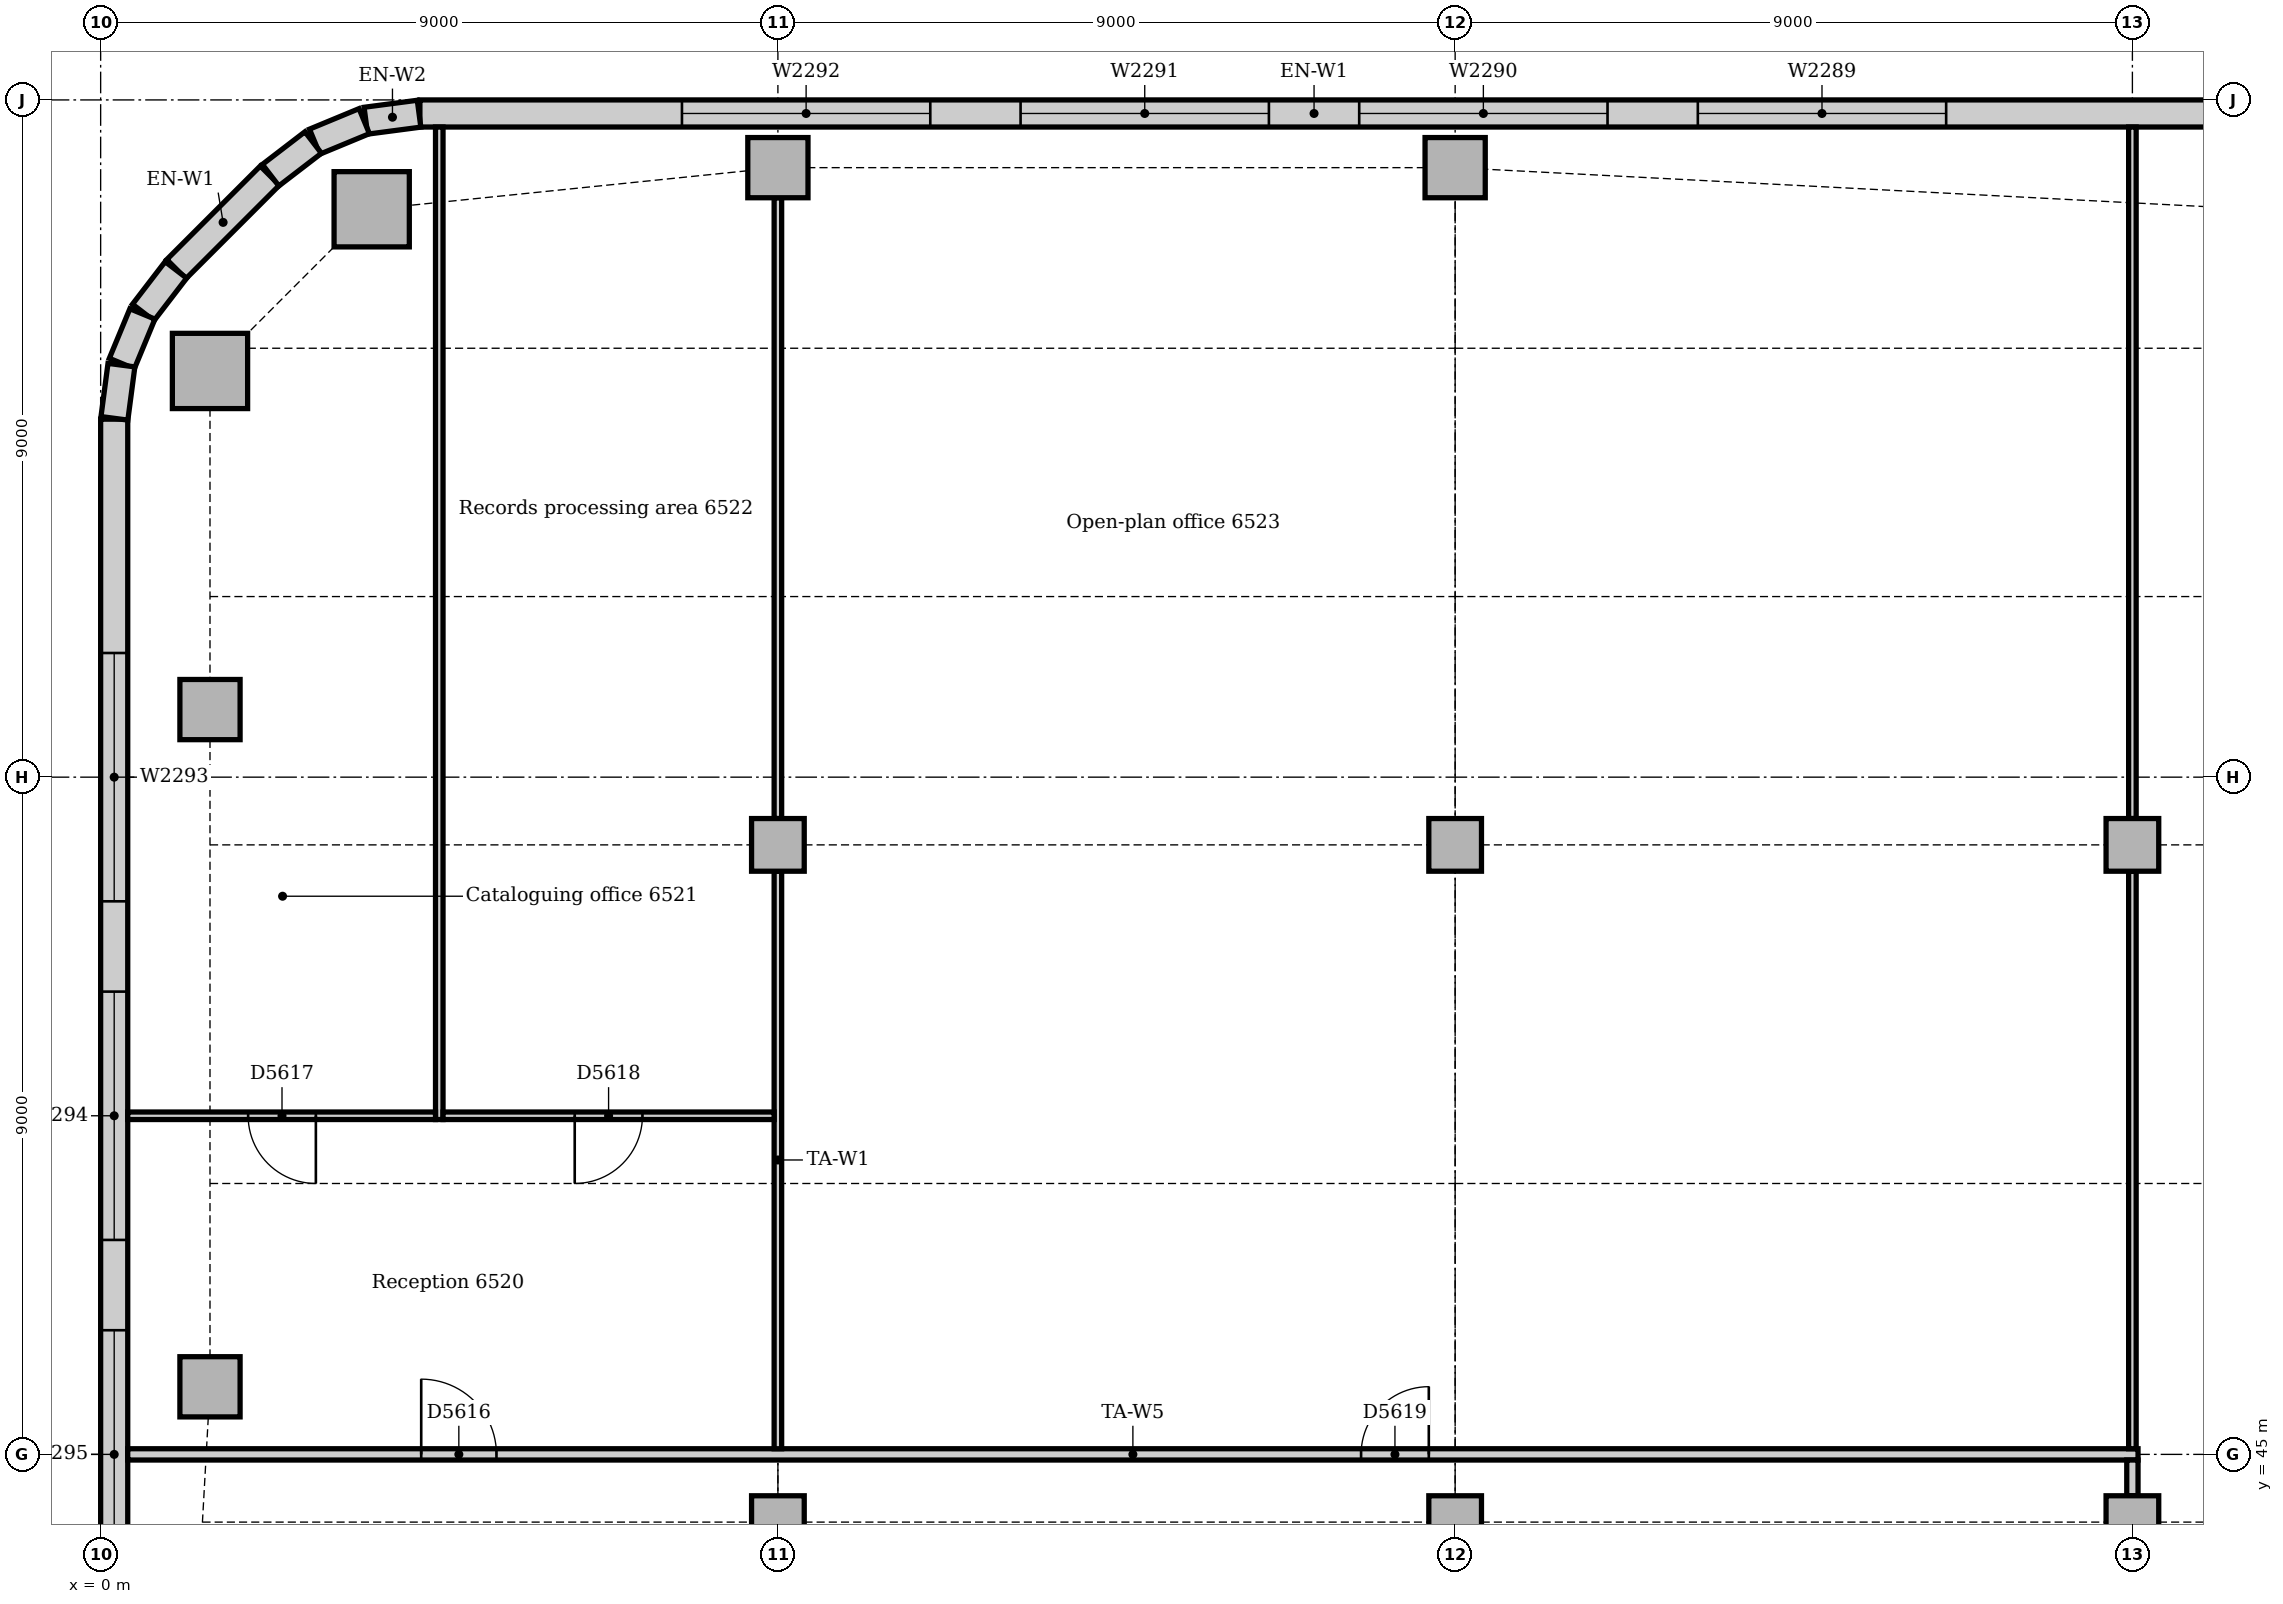
"""IFC4 building model, lengths in metres.
Left out: names, types, materials, properties, quantities, classifications, styles, units other than length and angle.
Written with IfcOpenShell. Run it as: python <this file> out.ifc"""

import sys

from ifc_helpers import new_model, si_unit, direction, frame, frame_2d, origin, origin_2d, place, context, subcontext, project, spatial, rectangle, extrude, element, fill, save


model = new_model("IFC4")
c1 = context("Model", 3, precision=1e-05, world=origin(), true_north=direction((0.0, 1.0)))
c2 = subcontext(c1, "Body", "Model", "MODEL_VIEW")
j1 = project(units=[si_unit("LENGTHUNIT", "METRE"), si_unit("PLANEANGLEUNIT", "RADIAN")], contexts=[c1])
p1 = place(None, origin())
s1 = spatial("IfcSite", under=j1, at=p1, CompositionType="ELEMENT")
p2 = place(p1, origin())
s2 = spatial("IfcBuilding", under=s1, at=p2, CompositionType="ELEMENT")
p3 = place(p2, frame((0.0, 0.0, 271.0)))
s3 = spatial("IfcBuildingStorey", under=s2, at=p3, CompositionType="ELEMENT", Elevation=271.0)
for number, where, z_axis, x_axis in (
    (1, (3.602, 61.547, 0.0), (0.0, 0.0, 1.0), (1.0, 0.0, 0.0)),
    (2, (1.453, 59.398, 0.0), (0.0, 0.0, 1.0), (1.0, 0.0, 0.0)),
):
    element("IfcColumn", number, at=place(p3, frame(where, z_axis=z_axis, x_axis=x_axis)), inside=s3, PredefinedType="COLUMN", context=c2, shape_type="SweptSolid", body=[
        extrude(rectangle(XDim=1.0, YDim=1.0, at=origin_2d()), origin(), (0.0, 0.0, 1.0), 3.85),
    ])
for number, where, z_axis, x_axis in (
    (3, (9.0, 62.1, 0.0), (0.0, 0.0, 1.0), (1.0, 0.0, 0.0)),
    (4, (18.0, 62.1, 0.0), (0.0, 0.0, 1.0), (1.0, 0.0, 0.0)),
    (5, (1.453, 45.898, 0.0), (0.0, 0.0, 1.0), (1.0, 0.0, 0.0)),
    (6, (1.453, 54.898, 0.0), (0.0, 0.0, 1.0), (1.0, 0.0, 0.0)),
):
    element("IfcColumn", number, at=place(p3, frame(where, z_axis=z_axis, x_axis=x_axis)), inside=s3, PredefinedType="COLUMN", context=c2, shape_type="SweptSolid", body=[
        extrude(rectangle(XDim=0.8, YDim=0.8, at=origin_2d()), origin(), (0.0, 0.0, 1.0), 3.85),
    ])
for number, where, z_axis, x_axis in (
    (7, (9.0, 44.1, 0.0), (0.0, 0.0, 1.0), (1.0, 0.0, 0.0)),
    (8, (9.0, 53.1, 0.0), (0.0, 0.0, 1.0), (1.0, 0.0, 0.0)),
    (9, (18.0, 44.1, 0.0), (0.0, 0.0, 1.0), (1.0, 0.0, 0.0)),
    (10, (18.0, 53.1, 0.0), (0.0, 0.0, 1.0), (1.0, 0.0, 0.0)),
    (11, (27.0, 44.1, 0.0), (0.0, 0.0, 1.0), (1.0, 0.0, 0.0)),
    (12, (27.0, 53.1, 0.0), (0.0, 0.0, 1.0), (1.0, 0.0, 0.0)),
):
    element("IfcColumn", number, at=place(p3, frame(where, z_axis=z_axis, x_axis=x_axis)), inside=s3, PredefinedType="COLUMN", context=c2, shape_type="SweptSolid", body=[
        extrude(rectangle(XDim=0.7, YDim=0.7, at=origin_2d()), origin(), (0.0, 0.0, 1.0), 3.85),
    ])
p4 = place(p3, frame((28.007, 62.82, 0.0), z_axis=(0.0, 0.0, 1.0), x_axis=(-1.0, 0.0, 0.0)))
e13 = element("IfcWall", 13, at=p4, inside=s3, PredefinedType="STANDARD", context=c2, shape_type="SweptSolid", body=[
    extrude(rectangle(XDim=23.765, YDim=0.36, at=frame_2d((11.882, 0.0))), origin(), (0.0, 0.0, 1.0), 3.85),
])
p5 = place(p4, frame((3.482, 0.0, 0.9)))
e14 = element("IfcOpeningElement", 14, at=p5, cuts=e13, PredefinedType="OPENING", context=c2, shape_type="SweptSolid", body=[
    extrude(rectangle(XDim=3.3, YDim=1.6, at=frame_2d((1.65, 0.8))), frame((0.0, 0.19, 0.0), z_axis=(0.0, -1.0, 0.0), x_axis=(1.0, 0.0, 0.0)), (0.0, 0.0, 1.0), 0.38),
])
p6 = place(p4, frame((7.982, 0.0, 0.9)))
e15 = element("IfcOpeningElement", 15, at=p6, cuts=e13, PredefinedType="OPENING", context=c2, shape_type="SweptSolid", body=[
    extrude(rectangle(XDim=3.3, YDim=1.6, at=frame_2d((1.65, 0.8))), frame((0.0, 0.19, 0.0), z_axis=(0.0, -1.0, 0.0), x_axis=(1.0, 0.0, 0.0)), (0.0, 0.0, 1.0), 0.38),
])
p7 = place(p4, frame((12.482, 0.0, 0.9)))
e16 = element("IfcOpeningElement", 16, at=p7, cuts=e13, PredefinedType="OPENING", context=c2, shape_type="SweptSolid", body=[
    extrude(rectangle(XDim=3.3, YDim=1.6, at=frame_2d((1.65, 0.8))), frame((0.0, 0.19, 0.0), z_axis=(0.0, -1.0, 0.0), x_axis=(1.0, 0.0, 0.0)), (0.0, 0.0, 1.0), 0.38),
])
p8 = place(p4, frame((16.982, 0.0, 0.9)))
e17 = element("IfcOpeningElement", 17, at=p8, cuts=e13, PredefinedType="OPENING", context=c2, shape_type="SweptSolid", body=[
    extrude(rectangle(XDim=3.3, YDim=1.6, at=frame_2d((1.65, 0.8))), frame((0.0, 0.19, 0.0), z_axis=(0.0, -1.0, 0.0), x_axis=(1.0, 0.0, 0.0)), (0.0, 0.0, 1.0), 0.38),
])
p9 = place(p3, frame((2.249, 61.994, 0.0), z_axis=(0.0, 0.0, 1.0), x_axis=(-0.707106781187, -0.707106781187, 0.0)))
e18 = element("IfcWall", 18, at=p9, inside=s3, PredefinedType="STANDARD", context=c2, shape_type="SweptSolid", body=[
    extrude(rectangle(XDim=1.757, YDim=0.36, at=frame_2d((0.879, 0.0))), origin(), (0.0, 0.0, 1.0), 3.85),
])
p10 = place(p3, frame((0.18, 58.757, 0.0), z_axis=(0.0, 0.0, 1.0), x_axis=(0.0, -1.0, 0.0)))
e19 = element("IfcWall", 19, at=p10, inside=s3, PredefinedType="STANDARD", context=c2, shape_type="SweptSolid", body=[
    extrude(rectangle(XDim=16.757, YDim=0.36, at=frame_2d((8.379, 0.0))), origin(), (0.0, 0.0, 1.0), 3.85),
])
p11 = place(p10, frame((3.107, 0.0, 0.9)))
e20 = element("IfcOpeningElement", 20, at=p11, cuts=e19, PredefinedType="OPENING", context=c2, shape_type="SweptSolid", body=[
    extrude(rectangle(XDim=3.3, YDim=1.6, at=frame_2d((1.65, 0.8))), frame((0.0, 0.19, 0.0), z_axis=(0.0, -1.0, 0.0), x_axis=(1.0, 0.0, 0.0)), (0.0, 0.0, 1.0), 0.38),
])
p12 = place(p10, frame((7.607, 0.0, 0.9)))
e21 = element("IfcOpeningElement", 21, at=p12, cuts=e19, PredefinedType="OPENING", context=c2, shape_type="SweptSolid", body=[
    extrude(rectangle(XDim=3.3, YDim=1.6, at=frame_2d((1.65, 0.8))), frame((0.0, 0.19, 0.0), z_axis=(0.0, -1.0, 0.0), x_axis=(1.0, 0.0, 0.0)), (0.0, 0.0, 1.0), 0.38),
])
p13 = place(p10, frame((12.107, 0.0, 0.9)))
e22 = element("IfcOpeningElement", 22, at=p13, cuts=e19, PredefinedType="OPENING", context=c2, shape_type="SweptSolid", body=[
    extrude(rectangle(XDim=3.3, YDim=1.6, at=frame_2d((1.65, 0.8))), frame((0.0, 0.19, 0.0), z_axis=(0.0, -1.0, 0.0), x_axis=(1.0, 0.0, 0.0)), (0.0, 0.0, 1.0), 0.38),
])
for number, where, z_axis, x_axis in (
    (23, (4.231, 62.817, 0.0), (0.0, 0.0, 1.0), (-0.991, -0.131, 0.0)),
    (24, (3.503, 62.718, 0.0), (0.0, 0.0, 1.0), (-0.924, -0.383, 0.0)),
):
    element("IfcWall", number, at=place(p3, frame(where, z_axis=z_axis, x_axis=x_axis)), inside=s3, PredefinedType="STANDARD", context=c2, shape_type="SweptSolid", body=[
        extrude(rectangle(XDim=0.713, YDim=0.36, at=frame_2d((0.356, 0.0))), origin(), (0.0, 0.0, 1.0), 3.85),
    ])
for number, where, z_axis, x_axis in (
    (25, (2.825, 62.434, 0.0), (0.0, 0.0, 1.0), (-0.793, -0.609, 0.0)),
    (26, (1.0, 60.741, 0.0), (0.0, 0.0, 1.0), (-0.609, -0.793, 0.0)),
):
    element("IfcWall", number, at=place(p3, frame(where, z_axis=z_axis, x_axis=x_axis)), inside=s3, PredefinedType="STANDARD", context=c2, shape_type="SweptSolid", body=[
        extrude(rectangle(XDim=0.713, YDim=0.36, at=frame_2d((0.357, 0.0))), origin(), (0.0, 0.0, 1.0), 3.85),
    ])
for number, where, z_axis, x_axis in (
    (27, (0.555, 60.156, 0.0), (0.0, 0.0, 1.0), (-0.383, -0.924, 0.0)),
    (28, (0.276, 59.476, 0.0), (0.0, 0.0, 1.0), (-0.131, -0.991, 0.0)),
):
    element("IfcWall", number, at=place(p3, frame(where, z_axis=z_axis, x_axis=x_axis)), inside=s3, PredefinedType="STANDARD", context=c2, shape_type="SweptSolid", body=[
        extrude(rectangle(XDim=0.713, YDim=0.36, at=frame_2d((0.356, 0.0))), origin(), (0.0, 0.0, 1.0), 3.85),
    ])
p14 = place(p3, frame((0.36, 45.0, 0.0), z_axis=(0.0, 0.0, 1.0), x_axis=(1.0, 0.0, 0.0)))
e29 = element("IfcWall", 29, at=p14, inside=s3, PredefinedType="PARTITIONING", context=c2, shape_type="SweptSolid", body=[
    extrude(rectangle(XDim=26.715, YDim=0.15, at=frame_2d((13.357, 0.0))), origin(), (0.0, 0.0, 1.0), 3.85),
])
p15 = place(p14, frame((3.9, 0.0, 0.0)))
e30 = element("IfcOpeningElement", 30, at=p15, cuts=e29, PredefinedType="OPENING", context=c2, shape_type="SweptSolid", body=[
    extrude(rectangle(XDim=1.0, YDim=2.1, at=frame_2d((0.5, 1.05))), frame((0.0, 0.085, 0.0), z_axis=(0.0, -1.0, 0.0), x_axis=(1.0, 0.0, 0.0)), (0.0, 0.0, 1.0), 0.17),
])
p16 = place(p14, frame((16.39, 0.0, 0.0)))
e31 = element("IfcOpeningElement", 31, at=p16, cuts=e29, PredefinedType="OPENING", context=c2, shape_type="SweptSolid", body=[
    extrude(rectangle(XDim=0.9, YDim=2.1, at=frame_2d((0.45, 1.05))), frame((0.0, 0.085, 0.0), z_axis=(0.0, -1.0, 0.0), x_axis=(1.0, 0.0, 0.0)), (0.0, 0.0, 1.0), 0.17),
])
p17 = place(p3, frame((27.0, 44.45, 0.0), z_axis=(0.0, 0.0, 1.0), x_axis=(0.0, 1.0, 0.0)))
e32 = element("IfcWall", 32, at=p17, inside=s3, PredefinedType="PARTITIONING", context=c2, shape_type="SweptSolid", body=[
    extrude(rectangle(XDim=0.475, YDim=0.15, at=frame_2d((0.237, 0.0))), origin(), (0.0, 0.0, 1.0), 3.85),
])
p18 = place(p3, frame((9.0, 45.075, 0.0), z_axis=(0.0, 0.0, 1.0), x_axis=(0.0, 1.0, 0.0)))
e33 = element("IfcWall", 33, at=p18, inside=s3, PredefinedType="PARTITIONING", context=c2, shape_type="SweptSolid", body=[
    extrude(rectangle(XDim=7.675, YDim=0.1, at=frame_2d((3.837, 0.0))), origin(), (0.0, 0.0, 1.0), 3.4),
])
p19 = place(p3, frame((9.0, 53.45, 0.0), z_axis=(0.0, 0.0, 1.0), x_axis=(0.0, 1.0, 0.0)))
e34 = element("IfcWall", 34, at=p19, inside=s3, PredefinedType="PARTITIONING", context=c2, shape_type="SweptSolid", body=[
    extrude(rectangle(XDim=8.25, YDim=0.1, at=frame_2d((4.125, 0.0))), origin(), (0.0, 0.0, 1.0), 3.4),
])
p20 = place(p3, frame((27.0, 45.075, 0.0), z_axis=(0.0, 0.0, 1.0), x_axis=(0.0, 1.0, 0.0)))
e35 = element("IfcWall", 35, at=p20, inside=s3, PredefinedType="PARTITIONING", context=c2, shape_type="SweptSolid", body=[
    extrude(rectangle(XDim=7.675, YDim=0.1, at=frame_2d((3.837, 0.0))), origin(), (0.0, 0.0, 1.0), 3.4),
])
p21 = place(p3, frame((27.0, 53.45, 0.0), z_axis=(0.0, 0.0, 1.0), x_axis=(0.0, 1.0, 0.0)))
e36 = element("IfcWall", 36, at=p21, inside=s3, PredefinedType="PARTITIONING", context=c2, shape_type="SweptSolid", body=[
    extrude(rectangle(XDim=9.19, YDim=0.1, at=frame_2d((4.595, 0.0))), origin(), (0.0, 0.0, 1.0), 3.4),
])
p22 = place(p3, frame((4.5, 49.45, 0.0), z_axis=(0.0, 0.0, 1.0), x_axis=(0.0, 1.0, 0.0)))
e37 = element("IfcWall", 37, at=p22, inside=s3, PredefinedType="PARTITIONING", context=c2, shape_type="SweptSolid", body=[
    extrude(rectangle(XDim=13.19, YDim=0.1, at=frame_2d((6.595, 0.0))), origin(), (0.0, 0.0, 1.0), 3.85),
])
p23 = place(p3, frame((4.55, 49.5, 0.0), z_axis=(0.0, 0.0, 1.0), x_axis=(1.0, 0.0, 0.0)))
e38 = element("IfcWall", 38, at=p23, inside=s3, PredefinedType="PARTITIONING", context=c2, shape_type="SweptSolid", body=[
    extrude(rectangle(XDim=4.4, YDim=0.1, at=frame_2d((2.2, 0.0))), origin(), (0.0, 0.0, 1.0), 3.85),
])
p24 = place(p23, frame((1.75, 0.0, 0.0)))
e39 = element("IfcOpeningElement", 39, at=p24, cuts=e38, PredefinedType="OPENING", context=c2, shape_type="SweptSolid", body=[
    extrude(rectangle(XDim=0.9, YDim=2.1, at=frame_2d((0.45, 1.05))), frame((0.0, 0.06, 0.0), z_axis=(0.0, -1.0, 0.0), x_axis=(1.0, 0.0, 0.0)), (0.0, 0.0, 1.0), 0.12),
])
p25 = place(p3, frame((0.36, 49.5, 0.0), z_axis=(0.0, 0.0, 1.0), x_axis=(1.0, 0.0, 0.0)))
e40 = element("IfcWall", 40, at=p25, inside=s3, PredefinedType="PARTITIONING", context=c2, shape_type="SweptSolid", body=[
    extrude(rectangle(XDim=4.09, YDim=0.1, at=frame_2d((2.045, 0.0))), origin(), (0.0, 0.0, 1.0), 3.85),
])
p26 = place(p25, frame((1.6, 0.0, 0.0)))
e41 = element("IfcOpeningElement", 41, at=p26, cuts=e40, PredefinedType="OPENING", context=c2, shape_type="SweptSolid", body=[
    extrude(rectangle(XDim=0.9, YDim=2.1, at=frame_2d((0.45, 1.05))), frame((0.0, 0.06, 0.0), z_axis=(0.0, -1.0, 0.0), x_axis=(1.0, 0.0, 0.0)), (0.0, 0.0, 1.0), 0.12),
])
p27 = place(p5, origin())
e42 = element("IfcWindow", 42, at=p27, inside=s3, PartitioningType="SINGLE_PANEL", PredefinedType="WINDOW", context=c2, shape_type="SweptSolid", body=[
    extrude(rectangle(XDim=3.3, YDim=1.6, at=frame_2d((1.65, 0.8))), frame((0.0, 0.13, 0.0), z_axis=(0.0, -1.0, 0.0), x_axis=(1.0, 0.0, 0.0)), (0.0, 0.0, 1.0), 0.06),
])
fill(e14, e42)
p28 = place(p6, origin())
e43 = element("IfcWindow", 43, at=p28, inside=s3, PartitioningType="SINGLE_PANEL", PredefinedType="WINDOW", context=c2, shape_type="SweptSolid", body=[
    extrude(rectangle(XDim=3.3, YDim=1.6, at=frame_2d((1.65, 0.8))), frame((0.0, 0.13, 0.0), z_axis=(0.0, -1.0, 0.0), x_axis=(1.0, 0.0, 0.0)), (0.0, 0.0, 1.0), 0.06),
])
fill(e15, e43)
p29 = place(p7, origin())
e44 = element("IfcWindow", 44, at=p29, inside=s3, PartitioningType="SINGLE_PANEL", PredefinedType="WINDOW", context=c2, shape_type="SweptSolid", body=[
    extrude(rectangle(XDim=3.3, YDim=1.6, at=frame_2d((1.65, 0.8))), frame((0.0, 0.13, 0.0), z_axis=(0.0, -1.0, 0.0), x_axis=(1.0, 0.0, 0.0)), (0.0, 0.0, 1.0), 0.06),
])
fill(e16, e44)
p30 = place(p8, origin())
e45 = element("IfcWindow", 45, at=p30, inside=s3, PartitioningType="SINGLE_PANEL", PredefinedType="WINDOW", context=c2, shape_type="SweptSolid", body=[
    extrude(rectangle(XDim=3.3, YDim=1.6, at=frame_2d((1.65, 0.8))), frame((0.0, 0.13, 0.0), z_axis=(0.0, -1.0, 0.0), x_axis=(1.0, 0.0, 0.0)), (0.0, 0.0, 1.0), 0.06),
])
fill(e17, e45)
p31 = place(p11, origin())
e46 = element("IfcWindow", 46, at=p31, inside=s3, PartitioningType="SINGLE_PANEL", PredefinedType="WINDOW", context=c2, shape_type="SweptSolid", body=[
    extrude(rectangle(XDim=3.3, YDim=1.6, at=frame_2d((1.65, 0.8))), frame((0.0, 0.13, 0.0), z_axis=(0.0, -1.0, 0.0), x_axis=(1.0, 0.0, 0.0)), (0.0, 0.0, 1.0), 0.06),
])
fill(e20, e46)
p32 = place(p12, origin())
e47 = element("IfcWindow", 47, at=p32, inside=s3, PartitioningType="SINGLE_PANEL", PredefinedType="WINDOW", context=c2, shape_type="SweptSolid", body=[
    extrude(rectangle(XDim=3.3, YDim=1.6, at=frame_2d((1.65, 0.8))), frame((0.0, 0.13, 0.0), z_axis=(0.0, -1.0, 0.0), x_axis=(1.0, 0.0, 0.0)), (0.0, 0.0, 1.0), 0.06),
])
fill(e21, e47)
p33 = place(p13, origin())
e48 = element("IfcWindow", 48, at=p33, inside=s3, PartitioningType="SINGLE_PANEL", PredefinedType="WINDOW", context=c2, shape_type="SweptSolid", body=[
    extrude(rectangle(XDim=3.3, YDim=1.6, at=frame_2d((1.65, 0.8))), frame((0.0, 0.13, 0.0), z_axis=(0.0, -1.0, 0.0), x_axis=(1.0, 0.0, 0.0)), (0.0, 0.0, 1.0), 0.06),
])
fill(e22, e48)
p34 = place(p15, origin())
e49 = element("IfcDoor", 49, at=p34, inside=s3, OperationType="SINGLE_SWING_LEFT", PredefinedType="DOOR", context=c2, shape_type="SweptSolid", body=[
    extrude(rectangle(XDim=1.0, YDim=2.1, at=frame_2d((0.5, 1.05))), frame((0.0, 0.025, 0.0), z_axis=(0.0, -1.0, 0.0), x_axis=(1.0, 0.0, 0.0)), (0.0, 0.0, 1.0), 0.05),
])
fill(e30, e49)
p35 = place(p26, frame((0.9, 0.0, 0.0), z_axis=(0.0, 0.0, 1.0), x_axis=(-1.0, 0.0, 0.0)))
e50 = element("IfcDoor", 50, at=p35, inside=s3, OperationType="SINGLE_SWING_LEFT", PredefinedType="DOOR", context=c2, shape_type="SweptSolid", body=[
    extrude(rectangle(XDim=0.9, YDim=2.1, at=frame_2d((0.45, 1.05))), frame((0.0, 0.025, 0.0), z_axis=(0.0, -1.0, 0.0), x_axis=(1.0, 0.0, 0.0)), (0.0, 0.0, 1.0), 0.05),
])
fill(e41, e50)
p36 = place(p24, frame((0.9, 0.0, 0.0), z_axis=(0.0, 0.0, 1.0), x_axis=(-1.0, 0.0, 0.0)))
e51 = element("IfcDoor", 51, at=p36, inside=s3, OperationType="SINGLE_SWING_RIGHT", PredefinedType="DOOR", context=c2, shape_type="SweptSolid", body=[
    extrude(rectangle(XDim=0.9, YDim=2.1, at=frame_2d((0.45, 1.05))), frame((0.0, 0.025, 0.0), z_axis=(0.0, -1.0, 0.0), x_axis=(1.0, 0.0, 0.0)), (0.0, 0.0, 1.0), 0.05),
])
fill(e39, e51)
p37 = place(p16, origin())
e52 = element("IfcDoor", 52, at=p37, inside=s3, OperationType="SINGLE_SWING_RIGHT", PredefinedType="DOOR", context=c2, shape_type="SweptSolid", body=[
    extrude(rectangle(XDim=0.9, YDim=2.1, at=frame_2d((0.45, 1.05))), frame((0.0, 0.025, 0.0), z_axis=(0.0, -1.0, 0.0), x_axis=(1.0, 0.0, 0.0)), (0.0, 0.0, 1.0), 0.05),
])
fill(e31, e52)
save(model, sys.argv[1])
